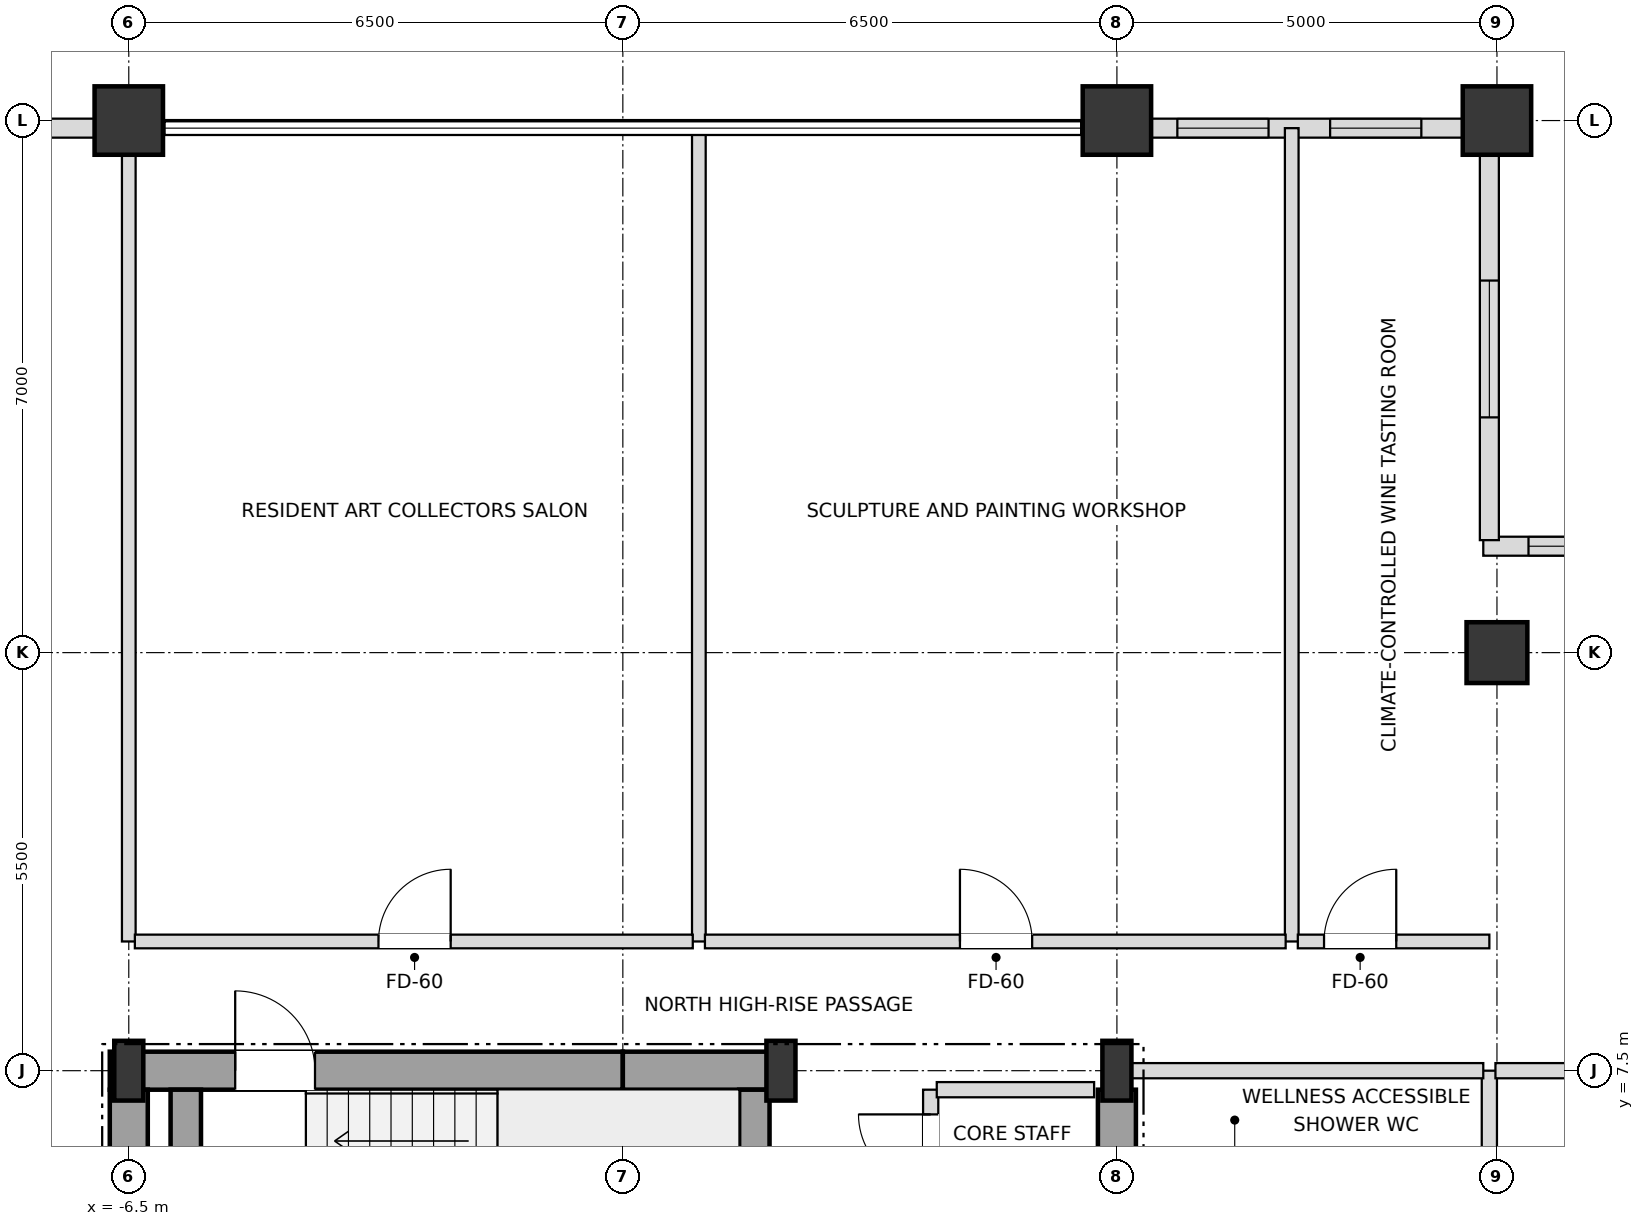
"""IFC4 building model, lengths in metres.
Left out: names, types, materials, properties, quantities, classifications, styles, units other than length and angle.
Written with IfcOpenShell. Run it as: python <this file> out.ifc"""

import sys

from ifc_helpers import new_model, si_unit, direction, frame, frame_2d, origin, origin_2d, place, context, subcontext, project, spatial, rectangle, i_section, extrude, element, fill, save


model = new_model("IFC4")
c1 = context("Model", 3, precision=1e-05, world=origin(), true_north=direction((0.0, 1.0)))
c2 = subcontext(c1, "Body", "Model", "MODEL_VIEW")
j1 = project(units=[si_unit("LENGTHUNIT", "METRE"), si_unit("PLANEANGLEUNIT", "RADIAN")], contexts=[c1])
p1 = place(None, origin())
s1 = spatial("IfcSite", under=j1, at=p1, CompositionType="ELEMENT")
p2 = place(p1, origin())
s2 = spatial("IfcBuilding", under=s1, at=p2, CompositionType="ELEMENT")
p3 = place(p2, frame((0.0, 0.0, 269.1)))
s3 = spatial("IfcBuildingStorey", under=s2, at=p3, CompositionType="ELEMENT", Elevation=269.1)
for number, where, z_axis, x_axis in (
    (1, (-6.5, 7.5, 0.0), (0.0, 0.0, 1.0), (1.0, 0.0, 0.0)),
    (2, (2.08, 7.5, 0.0), (0.0, 0.0, 1.0), (1.0, 0.0, 0.0)),
    (3, (6.5, 7.5, 0.0), (0.0, 0.0, 1.0), (1.0, 0.0, 0.0)),
):
    element("IfcColumn", number, at=place(p3, frame(where, z_axis=z_axis, x_axis=x_axis)), inside=s3, PredefinedType="COLUMN", context=c2, shape_type="SweptSolid", body=[
        extrude(i_section(OverallWidth=0.382, OverallDepth=0.786, WebThickness=0.02, FlangeThickness=0.033, at=origin_2d()), origin(), (0.0, 0.0, 1.0), 3.6),
    ])
for number, where, z_axis, x_axis in (
    (4, (11.5, 20.0, 0.0), (0.0, 0.0, 1.0), (1.0, 0.0, 0.0)),
    (5, (6.5, 20.0, 0.0), (0.0, 0.0, 1.0), (1.0, 0.0, 0.0)),
    (6, (-6.5, 20.0, 0.0), (0.0, 0.0, 1.0), (1.0, 0.0, 0.0)),
):
    element("IfcColumn", number, at=place(p3, frame(where, z_axis=z_axis, x_axis=x_axis)), inside=s3, PredefinedType="USERDEFINED", context=c2, shape_type="SweptSolid", body=[
        extrude(rectangle(XDim=0.9, YDim=0.9, at=origin_2d()), origin(), (0.0, 0.0, 1.0), 3.6),
    ])
p4 = place(p3, frame((11.5, 13.0, 0.0), z_axis=(0.0, 0.0, 1.0), x_axis=(1.0, 0.0, 0.0)))
e7 = element("IfcColumn", 7, at=p4, inside=s3, PredefinedType="COLUMN", context=c2, shape_type="SweptSolid", body=[
    extrude(rectangle(XDim=0.8, YDim=0.8, at=origin_2d()), origin(), (0.0, 0.0, 1.0), 3.6),
])
p5 = place(p3, frame((11.055, 19.9, 0.0), z_axis=(0.0, 0.0, 1.0), x_axis=(-1.0, 0.0, 0.0)))
e8 = element("IfcWall", 8, at=p5, inside=s3, PredefinedType="SOLIDWALL", context=c2, shape_type="SweptSolid", body=[
    extrude(rectangle(XDim=4.11, YDim=0.25, at=frame_2d((2.055, 0.0))), origin(), (0.0, 0.0, 1.0), 2.748),
])
p6 = place(p5, frame((0.55, 0.0, 0.72)))
e9 = element("IfcOpeningElement", 9, at=p6, cuts=e8, PredefinedType="OPENING", context=c2, shape_type="SweptSolid", body=[
    extrude(rectangle(XDim=1.2, YDim=1.68, at=frame_2d((0.6, 0.84))), frame((0.0, 0.135, 0.0), z_axis=(0.0, -1.0, 0.0), x_axis=(1.0, 0.0, 0.0)), (0.0, 0.0, 1.0), 0.27),
])
p7 = place(p5, frame((2.56, 0.0, 0.72)))
e10 = element("IfcOpeningElement", 10, at=p7, cuts=e8, PredefinedType="OPENING", context=c2, shape_type="SweptSolid", body=[
    extrude(rectangle(XDim=1.2, YDim=1.68, at=frame_2d((0.6, 0.84))), frame((0.0, 0.135, 0.0), z_axis=(0.0, -1.0, 0.0), x_axis=(1.0, 0.0, 0.0)), (0.0, 0.0, 1.0), 0.27),
])
p8 = place(p3, frame((-6.945, 19.9, 0.0), z_axis=(0.0, 0.0, 1.0), x_axis=(-1.0, 0.0, 0.0)))
e11 = element("IfcWall", 11, at=p8, inside=s3, PredefinedType="SOLIDWALL", context=c2, shape_type="SweptSolid", body=[
    extrude(rectangle(XDim=4.11, YDim=0.25, at=frame_2d((2.055, 0.0))), origin(), (0.0, 0.0, 1.0), 2.748),
])
p9 = place(p8, frame((1.155, 0.0, 0.72)))
e12 = element("IfcOpeningElement", 12, at=p9, cuts=e11, PredefinedType="OPENING", context=c2, shape_type="SweptSolid", body=[
    extrude(rectangle(XDim=1.8, YDim=1.68, at=frame_2d((0.9, 0.84))), frame((0.0, 0.135, 0.0), z_axis=(0.0, -1.0, 0.0), x_axis=(1.0, 0.0, 0.0)), (0.0, 0.0, 1.0), 0.27),
])
p10 = place(p3, frame((16.98, 14.4, 0.0), z_axis=(0.0, 0.0, 1.0), x_axis=(-1.0, 0.0, 0.0)))
e13 = element("IfcWall", 13, at=p10, inside=s3, PredefinedType="SOLIDWALL", context=c2, shape_type="SweptSolid", body=[
    extrude(rectangle(XDim=5.66, YDim=0.25, at=frame_2d((2.83, 0.0))), origin(), (0.0, 0.0, 1.0), 2.748),
])
p11 = place(p10, frame((0.595, 0.0, 0.72)))
e14 = element("IfcOpeningElement", 14, at=p11, cuts=e13, PredefinedType="OPENING", context=c2, shape_type="SweptSolid", body=[
    extrude(rectangle(XDim=1.8, YDim=1.68, at=frame_2d((0.9, 0.84))), frame((0.0, 0.135, 0.0), z_axis=(0.0, -1.0, 0.0), x_axis=(1.0, 0.0, 0.0)), (0.0, 0.0, 1.0), 0.27),
])
p12 = place(p10, frame((3.265, 0.0, 0.72)))
e15 = element("IfcOpeningElement", 15, at=p12, cuts=e13, PredefinedType="OPENING", context=c2, shape_type="SweptSolid", body=[
    extrude(rectangle(XDim=1.8, YDim=1.68, at=frame_2d((0.9, 0.84))), frame((0.0, 0.135, 0.0), z_axis=(0.0, -1.0, 0.0), x_axis=(1.0, 0.0, 0.0)), (0.0, 0.0, 1.0), 0.27),
])
p13 = place(p3, frame((11.4, 14.48, 0.0), z_axis=(0.0, 0.0, 1.0), x_axis=(0.0, 1.0, 0.0)))
e16 = element("IfcWall", 16, at=p13, inside=s3, PredefinedType="SOLIDWALL", context=c2, shape_type="SweptSolid", body=[
    extrude(rectangle(XDim=5.34, YDim=0.25, at=frame_2d((2.67, 0.0))), origin(), (0.0, 0.0, 1.0), 2.748),
])
p14 = place(p13, frame((1.615, 0.0, 0.72)))
e17 = element("IfcOpeningElement", 17, at=p14, cuts=e16, PredefinedType="OPENING", context=c2, shape_type="SweptSolid", body=[
    extrude(rectangle(XDim=1.8, YDim=1.68, at=frame_2d((0.9, 0.84))), frame((0.0, 0.135, 0.0), z_axis=(0.0, -1.0, 0.0), x_axis=(1.0, 0.0, 0.0)), (0.0, 0.0, 1.0), 0.27),
])
p15 = place(p3, frame((-6.75, 7.5, 0.0), z_axis=(0.0, 0.0, 1.0), x_axis=(1.0, 0.0, 0.0)))
e18 = element("IfcWall", 18, at=p15, inside=s3, PredefinedType="SHEAR", context=c2, shape_type="SweptSolid", body=[
    extrude(rectangle(XDim=6.75, YDim=0.5, at=frame_2d((3.375, 0.0))), origin(), (0.0, 0.0, 1.0), 3.38),
])
p16 = place(p15, frame((1.65, 0.0, 0.0)))
e19 = element("IfcOpeningElement", 19, at=p16, cuts=e18, PredefinedType="OPENING", context=c2, shape_type="SweptSolid", body=[
    extrude(rectangle(XDim=1.05, YDim=2.15, at=frame_2d((0.525, 1.075))), frame((0.0, 0.26, 0.0), z_axis=(0.0, -1.0, 0.0), x_axis=(1.0, 0.0, 0.0)), (0.0, 0.0, 1.0), 0.52),
])
p17 = place(p3, frame((0.0, 7.5, 0.0), z_axis=(0.0, 0.0, 1.0), x_axis=(1.0, 0.0, 0.0)))
e20 = element("IfcWall", 20, at=p17, inside=s3, PredefinedType="SHEAR", context=c2, shape_type="SweptSolid", body=[
    extrude(rectangle(XDim=2.08, YDim=0.5, at=frame_2d((1.04, 0.0))), origin(), (0.0, 0.0, 1.0), 3.38),
])
for number, where, z_axis, x_axis in (
    (21, (-6.5, 3.95, 0.0), (0.0, 0.0, 1.0), (0.0, 1.0, 0.0)),
    (22, (6.5, 3.95, 0.0), (0.0, 0.0, 1.0), (0.0, 1.0, 0.0)),
):
    element("IfcWall", number, at=place(p3, frame(where, z_axis=z_axis, x_axis=x_axis)), inside=s3, PredefinedType="SHEAR", context=c2, shape_type="SweptSolid", body=[
        extrude(rectangle(XDim=3.3, YDim=0.5, at=frame_2d((1.65, 0.0))), origin(), (0.0, 0.0, 1.0), 3.38),
    ])
for number, where, z_axis, x_axis in (
    (23, (1.73, 3.95, 0.0), (0.0, 0.0, 1.0), (0.0, 1.0, 0.0)),
    (24, (-5.75, 3.95, 0.0), (0.0, 0.0, 1.0), (0.0, 1.0, 0.0)),
):
    element("IfcWall", number, at=place(p3, frame(where, z_axis=z_axis, x_axis=x_axis)), inside=s3, PredefinedType="SHEAR", context=c2, shape_type="SweptSolid", body=[
        extrude(rectangle(XDim=3.3, YDim=0.4, at=frame_2d((1.65, 0.0))), origin(), (0.0, 0.0, 1.0), 3.38),
    ])
p18 = place(p3, frame((-6.5, 9.2, 0.0), z_axis=(0.0, 0.0, 1.0), x_axis=(0.0, 1.0, 0.0)))
e25 = element("IfcWall", 25, at=p18, inside=s3, PredefinedType="PARTITIONING", context=c2, shape_type="SweptSolid", body=[
    extrude(rectangle(XDim=10.7, YDim=0.18, at=frame_2d((5.35, 0.0))), origin(), (0.0, 0.0, 1.0), 2.826),
])
p19 = place(p3, frame((1.0, 9.2, 0.0), z_axis=(0.0, 0.0, 1.0), x_axis=(0.0, 1.0, 0.0)))
e26 = element("IfcWall", 26, at=p19, inside=s3, PredefinedType="PARTITIONING", context=c2, shape_type="SweptSolid", body=[
    extrude(rectangle(XDim=10.7, YDim=0.18, at=frame_2d((5.35, 0.0))), origin(), (0.0, 0.0, 1.0), 3.018),
])
p20 = place(p3, frame((4.05, 4.2, 0.0), z_axis=(0.0, 0.0, 1.0), x_axis=(0.0, 1.0, 0.0)))
e27 = element("IfcWall", 27, at=p20, inside=s3, PredefinedType="SOLIDWALL", context=c2, shape_type="SweptSolid", body=[
    extrude(rectangle(XDim=3.05, YDim=0.2, at=frame_2d((1.525, 0.0))), origin(), (0.0, 0.0, 1.0), 3.38),
])
p21 = place(p20, frame((0.275, 0.0, 0.0)))
e28 = element("IfcOpeningElement", 28, at=p21, cuts=e27, PredefinedType="OPENING", context=c2, shape_type="SweptSolid", body=[
    extrude(rectangle(XDim=0.95, YDim=2.15, at=frame_2d((0.475, 1.075))), frame((0.0, 0.11, 0.0), z_axis=(0.0, -1.0, 0.0), x_axis=(1.0, 0.0, 0.0)), (0.0, 0.0, 1.0), 0.22),
])
p22 = place(p20, frame((1.775, 0.0, 0.0)))
e29 = element("IfcOpeningElement", 29, at=p22, cuts=e27, PredefinedType="OPENING", context=c2, shape_type="SweptSolid", body=[
    extrude(rectangle(XDim=0.95, YDim=2.15, at=frame_2d((0.475, 1.075))), frame((0.0, 0.11, 0.0), z_axis=(0.0, -1.0, 0.0), x_axis=(1.0, 0.0, 0.0)), (0.0, 0.0, 1.0), 0.22),
])
p23 = place(p3, frame((8.8, 9.2, 0.0), z_axis=(0.0, 0.0, 1.0), x_axis=(0.0, 1.0, 0.0)))
e30 = element("IfcWall", 30, at=p23, inside=s3, PredefinedType="PARTITIONING", context=c2, shape_type="SweptSolid", body=[
    extrude(rectangle(XDim=10.7, YDim=0.18, at=frame_2d((5.35, 0.0))), origin(), (0.0, 0.0, 1.0), 2.826),
])
p24 = place(p3, frame((11.4, 4.5, 0.0), z_axis=(0.0, 0.0, 1.0), x_axis=(0.0, 1.0, 0.0)))
e31 = element("IfcWall", 31, at=p24, inside=s3, PredefinedType="SOLIDWALL", context=c2, shape_type="SweptSolid", body=[
    extrude(rectangle(XDim=3.0, YDim=0.2, at=frame_2d((1.5, 0.0))), origin(), (0.0, 0.0, 1.0), 3.018),
])
p25 = place(p3, frame((4.13, 7.25, 0.0), z_axis=(0.0, 0.0, 1.0), x_axis=(1.0, 0.0, 0.0)))
e32 = element("IfcWall", 32, at=p25, inside=s3, PredefinedType="SOLIDWALL", context=c2, shape_type="SweptSolid", body=[
    extrude(rectangle(XDim=2.07, YDim=0.2, at=frame_2d((1.035, 0.0))), origin(), (0.0, 0.0, 1.0), 3.38),
])
p26 = place(p3, frame((6.5, 7.5, 0.0), z_axis=(0.0, 0.0, 1.0), x_axis=(1.0, 0.0, 0.0)))
e33 = element("IfcWall", 33, at=p26, inside=s3, PredefinedType="SOLIDWALL", context=c2, shape_type="SweptSolid", body=[
    extrude(rectangle(XDim=4.82, YDim=0.2, at=frame_2d((2.41, 0.0))), origin(), (0.0, 0.0, 1.0), 2.826),
])
p27 = place(p3, frame((11.48, 7.5, 0.0), z_axis=(0.0, 0.0, 1.0), x_axis=(1.0, 0.0, 0.0)))
e34 = element("IfcWall", 34, at=p27, inside=s3, PredefinedType="SOLIDWALL", context=c2, shape_type="SweptSolid", body=[
    extrude(rectangle(XDim=5.42, YDim=0.2, at=frame_2d((2.71, 0.0))), origin(), (0.0, 0.0, 1.0), 2.826),
])
p28 = place(p3, frame((-6.42, 9.2, 0.0), z_axis=(0.0, 0.0, 1.0), x_axis=(1.0, 0.0, 0.0)))
e35 = element("IfcWall", 35, at=p28, inside=s3, PredefinedType="PARTITIONING", context=c2, shape_type="SweptSolid", body=[
    extrude(rectangle(XDim=7.34, YDim=0.18, at=frame_2d((3.67, 0.0))), origin(), (0.0, 0.0, 1.0), 3.38),
])
p29 = place(p28, frame((3.205, 0.0, 0.0)))
e36 = element("IfcOpeningElement", 36, at=p29, cuts=e35, PredefinedType="OPENING", context=c2, shape_type="SweptSolid", body=[
    extrude(rectangle(XDim=0.95, YDim=2.15, at=frame_2d((0.475, 1.075))), frame((0.0, 0.1, 0.0), z_axis=(0.0, -1.0, 0.0), x_axis=(1.0, 0.0, 0.0)), (0.0, 0.0, 1.0), 0.2),
])
p30 = place(p3, frame((1.08, 9.2, 0.0), z_axis=(0.0, 0.0, 1.0), x_axis=(1.0, 0.0, 0.0)))
e37 = element("IfcWall", 37, at=p30, inside=s3, PredefinedType="PARTITIONING", context=c2, shape_type="SweptSolid", body=[
    extrude(rectangle(XDim=7.64, YDim=0.18, at=frame_2d((3.82, 0.0))), origin(), (0.0, 0.0, 1.0), 2.826),
])
p31 = place(p30, frame((3.355, 0.0, 0.0)))
e38 = element("IfcOpeningElement", 38, at=p31, cuts=e37, PredefinedType="OPENING", context=c2, shape_type="SweptSolid", body=[
    extrude(rectangle(XDim=0.95, YDim=2.15, at=frame_2d((0.475, 1.075))), frame((0.0, 0.1, 0.0), z_axis=(0.0, -1.0, 0.0), x_axis=(1.0, 0.0, 0.0)), (0.0, 0.0, 1.0), 0.2),
])
p32 = place(p3, frame((8.88, 9.2, 0.0), z_axis=(0.0, 0.0, 1.0), x_axis=(1.0, 0.0, 0.0)))
e39 = element("IfcWall", 39, at=p32, inside=s3, PredefinedType="PARTITIONING", context=c2, shape_type="SweptSolid", body=[
    extrude(rectangle(XDim=2.52, YDim=0.18, at=frame_2d((1.26, 0.0))), origin(), (0.0, 0.0, 1.0), 3.38),
])
p33 = place(p32, frame((0.345, 0.0, 0.0)))
e40 = element("IfcOpeningElement", 40, at=p33, cuts=e39, PredefinedType="OPENING", context=c2, shape_type="SweptSolid", body=[
    extrude(rectangle(XDim=0.95, YDim=2.15, at=frame_2d((0.475, 1.075))), frame((0.0, 0.1, 0.0), z_axis=(0.0, -1.0, 0.0), x_axis=(1.0, 0.0, 0.0)), (0.0, 0.0, 1.0), 0.2),
])
p34 = place(p6, origin())
e41 = element("IfcWindow", 41, at=p34, inside=s3, PartitioningType="SINGLE_PANEL", PredefinedType="WINDOW", context=c2, shape_type="SweptSolid", body=[
    extrude(rectangle(XDim=1.2, YDim=1.68, at=frame_2d((0.6, 0.84))), frame((0.0, 0.03, 0.0), z_axis=(0.0, -1.0, 0.0), x_axis=(1.0, 0.0, 0.0)), (0.0, 0.0, 1.0), 0.06),
])
fill(e9, e41)
p35 = place(p7, origin())
e42 = element("IfcWindow", 42, at=p35, inside=s3, PartitioningType="SINGLE_PANEL", PredefinedType="WINDOW", context=c2, shape_type="SweptSolid", body=[
    extrude(rectangle(XDim=1.2, YDim=1.68, at=frame_2d((0.6, 0.84))), frame((0.0, 0.03, 0.0), z_axis=(0.0, -1.0, 0.0), x_axis=(1.0, 0.0, 0.0)), (0.0, 0.0, 1.0), 0.06),
])
fill(e10, e42)
p36 = place(p12, origin())
e43 = element("IfcWindow", 43, at=p36, inside=s3, PartitioningType="SINGLE_PANEL", PredefinedType="WINDOW", context=c2, shape_type="SweptSolid", body=[
    extrude(rectangle(XDim=1.8, YDim=1.68, at=frame_2d((0.9, 0.84))), frame((0.0, 0.03, 0.0), z_axis=(0.0, -1.0, 0.0), x_axis=(1.0, 0.0, 0.0)), (0.0, 0.0, 1.0), 0.06),
])
fill(e15, e43)
p37 = place(p14, origin())
e44 = element("IfcWindow", 44, at=p37, inside=s3, PartitioningType="SINGLE_PANEL", PredefinedType="WINDOW", context=c2, shape_type="SweptSolid", body=[
    extrude(rectangle(XDim=1.8, YDim=1.68, at=frame_2d((0.9, 0.84))), frame((0.0, 0.03, 0.0), z_axis=(0.0, -1.0, 0.0), x_axis=(1.0, 0.0, 0.0)), (0.0, 0.0, 1.0), 0.06),
])
fill(e17, e44)
p38 = place(p16, origin())
e45 = element("IfcDoor", 45, at=p38, inside=s3, OperationType="SINGLE_SWING_LEFT", PredefinedType="DOOR", context=c2, shape_type="SweptSolid", body=[
    extrude(rectangle(XDim=1.05, YDim=2.15, at=frame_2d((0.525, 1.075))), frame((0.0, 0.025, 0.0), z_axis=(0.0, -1.0, 0.0), x_axis=(1.0, 0.0, 0.0)), (0.0, 0.0, 1.0), 0.05),
])
fill(e19, e45)
p39 = place(p22, origin())
e46 = element("IfcDoor", 46, at=p39, inside=s3, OperationType="SINGLE_SWING_RIGHT", PredefinedType="DOOR", context=c2, shape_type="SweptSolid", body=[
    extrude(rectangle(XDim=0.95, YDim=2.15, at=frame_2d((0.475, 1.075))), frame((0.0, 0.025, 0.0), z_axis=(0.0, -1.0, 0.0), x_axis=(1.0, 0.0, 0.0)), (0.0, 0.0, 1.0), 0.05),
])
fill(e29, e46)
p40 = place(p29, origin())
e47 = element("IfcDoor", 47, at=p40, inside=s3, OperationType="SINGLE_SWING_RIGHT", PredefinedType="DOOR", context=c2, shape_type="SweptSolid", body=[
    extrude(rectangle(XDim=0.95, YDim=2.15, at=frame_2d((0.475, 1.075))), frame((0.0, 0.025, 0.0), z_axis=(0.0, -1.0, 0.0), x_axis=(1.0, 0.0, 0.0)), (0.0, 0.0, 1.0), 0.05),
])
fill(e36, e47)
p41 = place(p31, origin())
e48 = element("IfcDoor", 48, at=p41, inside=s3, OperationType="SINGLE_SWING_LEFT", PredefinedType="DOOR", context=c2, shape_type="SweptSolid", body=[
    extrude(rectangle(XDim=0.95, YDim=2.15, at=frame_2d((0.475, 1.075))), frame((0.0, 0.025, 0.0), z_axis=(0.0, -1.0, 0.0), x_axis=(1.0, 0.0, 0.0)), (0.0, 0.0, 1.0), 0.05),
])
fill(e38, e48)
p42 = place(p33, origin())
e49 = element("IfcDoor", 49, at=p42, inside=s3, OperationType="SINGLE_SWING_RIGHT", PredefinedType="DOOR", context=c2, shape_type="SweptSolid", body=[
    extrude(rectangle(XDim=0.95, YDim=2.15, at=frame_2d((0.475, 1.075))), frame((0.0, 0.025, 0.0), z_axis=(0.0, -1.0, 0.0), x_axis=(1.0, 0.0, 0.0)), (0.0, 0.0, 1.0), 0.05),
])
fill(e40, e49)
save(model, sys.argv[1])
